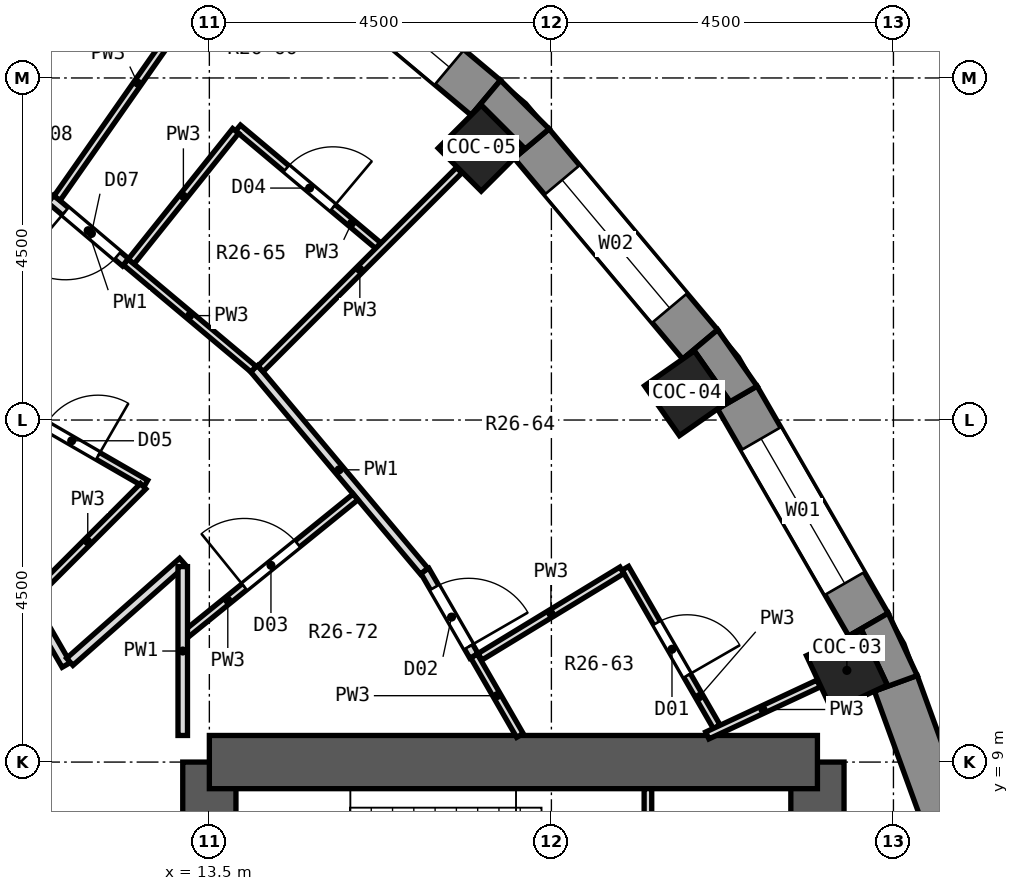
"""IFC4 building model, lengths in metres.
Left out: names, types, materials, properties, quantities, classifications, styles, units other than length and angle.
Written with IfcOpenShell. Run it as: python <this file> out.ifc"""

import sys

from ifc_helpers import new_model, si_unit, direction, frame, frame_2d, origin, origin_2d, place, context, subcontext, project, spatial, polyline, rectangle, outline, extrude, element, fill, save


model = new_model("IFC4")
c1 = context("Model", 3, precision=1e-05, world=origin(), true_north=direction((0.0, 1.0)))
c2 = subcontext(c1, "Body", "Model", "MODEL_VIEW")
j1 = project(units=[si_unit("LENGTHUNIT", "METRE"), si_unit("PLANEANGLEUNIT", "RADIAN")], contexts=[c1])
p1 = place(None, origin())
s1 = spatial("IfcSite", under=j1, at=p1, CompositionType="ELEMENT")
p2 = place(p1, origin())
s2 = spatial("IfcBuilding", under=s1, at=p2, CompositionType="ELEMENT")
p3 = place(p2, frame((0.0, 0.0, 170.7)))
s3 = spatial("IfcBuildingStorey", under=s2, at=p3, CompositionType="ELEMENT", Elevation=170.7)
for number, where, z_axis, x_axis in (
    (1, (21.887, 10.206, 0.0), (0.0, 0.0, 1.0), (0.906, 0.423, 0.0)),
    (2, (19.782, 13.852, 0.0), (0.0, 0.0, 1.0), (0.819, 0.574, 0.0)),
    (3, (17.077, 17.077, 0.0), (0.0, 0.0, 1.0), (0.707, 0.707, 0.0)),
):
    element("IfcColumn", number, at=place(p3, frame(where, z_axis=z_axis, x_axis=x_axis)), inside=s3, PredefinedType="COLUMN", context=c2, shape_type="SweptSolid", body=[
        extrude(rectangle(XDim=0.8, YDim=0.8, at=origin_2d()), origin(), (0.0, 0.0, 1.0), 3.3),
    ])
p4 = place(p3, frame((13.5, -9.0, 0.0), z_axis=(0.0, 0.0, 1.0), x_axis=(0.0, 1.0, 0.0)))
e4 = element("IfcWall", 4, at=p4, inside=s3, PredefinedType="SHEAR", context=c2, shape_type="SweptSolid", body=[
    extrude(rectangle(XDim=18.0, YDim=0.7, at=frame_2d((9.0, 0.0))), origin(), (0.0, 0.0, 1.0), 3.3),
])
p5 = place(p4, frame((15.4, 0.0, 0.0)))
e5 = element("IfcOpeningElement", 5, at=p5, cuts=e4, PredefinedType="OPENING", context=c2, shape_type="SweptSolid", body=[
    extrude(rectangle(XDim=1.2, YDim=2.1, at=frame_2d((0.6, 1.05))), frame((0.0, 0.362, 0.0), z_axis=(0.0, -1.0, 0.0), x_axis=(1.0, 0.0, 0.0)), (0.0, 0.0, 1.0), 0.724),
])
p6 = place(p4, frame((1.4, 0.0, 0.0)))
e6 = element("IfcOpeningElement", 6, at=p6, cuts=e4, PredefinedType="OPENING", context=c2, shape_type="SweptSolid", body=[
    extrude(rectangle(XDim=1.2, YDim=2.1, at=frame_2d((0.6, 1.05))), frame((0.0, 0.362, 0.0), z_axis=(0.0, -1.0, 0.0), x_axis=(1.0, 0.0, 0.0)), (0.0, 0.0, 1.0), 0.724),
])
p7 = place(p4, frame((7.5, 0.0, 0.0)))
e7 = element("IfcOpeningElement", 7, at=p7, cuts=e4, PredefinedType="OPENING", context=c2, shape_type="SweptSolid", body=[
    extrude(rectangle(XDim=3.0, YDim=2.4, at=frame_2d((1.5, 1.2))), frame((0.0, 0.362, 0.0), z_axis=(0.0, -1.0, 0.0), x_axis=(1.0, 0.0, 0.0)), (0.0, 0.0, 1.0), 0.724),
])
p8 = place(p3, frame((21.5, -9.0, 0.0), z_axis=(0.0, 0.0, 1.0), x_axis=(0.0, 1.0, 0.0)))
e8 = element("IfcWall", 8, at=p8, inside=s3, PredefinedType="SHEAR", context=c2, shape_type="SweptSolid", body=[
    extrude(rectangle(XDim=18.0, YDim=0.7, at=frame_2d((9.0, 0.0))), origin(), (0.0, 0.0, 1.0), 3.3),
])
p9 = place(p8, frame((9.45, 0.0, 0.0)))
e9 = element("IfcOpeningElement", 9, at=p9, cuts=e8, PredefinedType="OPENING", context=c2, shape_type="SweptSolid", body=[
    extrude(rectangle(XDim=0.9, YDim=2.1, at=frame_2d((0.45, 1.05))), frame((0.0, 0.362, 0.0), z_axis=(0.0, -1.0, 0.0), x_axis=(1.0, 0.0, 0.0)), (0.0, 0.0, 1.0), 0.724),
])
p10 = place(p8, frame((7.65, 0.0, 0.0)))
e10 = element("IfcOpeningElement", 10, at=p10, cuts=e8, PredefinedType="OPENING", context=c2, shape_type="SweptSolid", body=[
    extrude(rectangle(XDim=0.9, YDim=2.1, at=frame_2d((0.45, 1.05))), frame((0.0, 0.362, 0.0), z_axis=(0.0, -1.0, 0.0), x_axis=(1.0, 0.0, 0.0)), (0.0, 0.0, 1.0), 0.724),
])
p11 = place(p3, frame((13.5, 9.0, 0.0), z_axis=(0.0, 0.0, 1.0), x_axis=(1.0, 0.0, 0.0)))
e11 = element("IfcWall", 11, at=p11, inside=s3, PredefinedType="SHEAR", context=c2, shape_type="SweptSolid", body=[
    extrude(rectangle(XDim=8.0, YDim=0.7, at=frame_2d((4.0, 0.0))), origin(), (0.0, 0.0, 1.0), 3.3),
])
p12 = place(p3, frame((23.711, 6.794, 0.0), z_axis=(0.0, 0.0, 1.0), x_axis=(-0.342032843455, 0.93968799822, 0.0)))
e12 = element("IfcWall", 12, at=p12, inside=s3, PredefinedType="SOLIDWALL", context=c2, shape_type="SweptSolid", body=[
    extrude(rectangle(XDim=3.45, YDim=0.6, at=frame_2d((1.725, 0.0))), origin(), (0.0, 0.0, 1.0), 2.85),
])
p13 = place(p3, frame((22.171, 10.809, 0.0), z_axis=(0.0, 0.0, 1.0), x_axis=(-0.499998129301, 0.86602648383, 0.0)))
e13 = element("IfcWall", 13, at=p13, inside=s3, PredefinedType="SOLIDWALL", context=c2, shape_type="SweptSolid", body=[
    extrude(rectangle(XDim=3.45, YDim=0.6, at=frame_2d((1.725, 0.0))), origin(), (0.0, 0.0, 1.0), 2.85),
])
p14 = place(p13, frame((0.625, 0.0, 0.9)))
e14 = element("IfcOpeningElement", 14, at=p14, cuts=e13, PredefinedType="OPENING", context=c2, shape_type="SweptSolid", body=[
    extrude(rectangle(XDim=2.2, YDim=1.8, at=frame_2d((1.1, 0.9))), frame((0.0, 0.312, 0.0), z_axis=(0.0, -1.0, 0.0), x_axis=(1.0, 0.0, 0.0)), (0.0, 0.0, 1.0), 0.624),
])
p15 = place(p3, frame((19.957, 14.494, 0.0), z_axis=(0.0, 0.0, 1.0), x_axis=(-0.642770398358, 0.766058884809, 0.0)))
e15 = element("IfcWall", 15, at=p15, inside=s3, PredefinedType="SOLIDWALL", context=c2, shape_type="SweptSolid", body=[
    extrude(rectangle(XDim=3.449, YDim=0.6, at=frame_2d((1.725, 0.0))), origin(), (0.0, 0.0, 1.0), 2.85),
])
p16 = place(p15, frame((0.625, 0.0, 0.9)))
e16 = element("IfcOpeningElement", 16, at=p16, cuts=e15, PredefinedType="OPENING", context=c2, shape_type="SweptSolid", body=[
    extrude(rectangle(XDim=2.2, YDim=1.8, at=frame_2d((1.1, 0.9))), frame((0.0, 0.312, 0.0), z_axis=(0.0, -1.0, 0.0), x_axis=(1.0, 0.0, 0.0)), (0.0, 0.0, 1.0), 0.624),
])
p17 = place(p3, frame((17.137, 17.74, 0.0), z_axis=(0.0, 0.0, 1.0), x_axis=(-0.766058884809, 0.642770398358, 0.0)))
e17 = element("IfcWall", 17, at=p17, inside=s3, PredefinedType="SOLIDWALL", context=c2, shape_type="SweptSolid", body=[
    extrude(rectangle(XDim=3.449, YDim=0.6, at=frame_2d((1.725, 0.0))), origin(), (0.0, 0.0, 1.0), 2.85),
])
p18 = place(p17, frame((0.625, 0.0, 0.9)))
e18 = element("IfcOpeningElement", 18, at=p18, cuts=e17, PredefinedType="OPENING", context=c2, shape_type="SweptSolid", body=[
    extrude(rectangle(XDim=2.2, YDim=1.8, at=frame_2d((1.1, 0.9))), frame((0.0, 0.312, 0.0), z_axis=(0.0, -1.0, 0.0), x_axis=(1.0, 0.0, 0.0)), (0.0, 0.0, 1.0), 0.624),
])
p19 = place(p3, origin())
e19 = element("IfcWall", 19, at=p19, inside=s3, PredefinedType="SOLIDWALL", context=c2, shape_type="SweptSolid", body=[
    extrude(outline(polyline([(22.431, 10.959), (21.911, 10.659), (22.081, 10.738), (22.419, 10.013), (22.249, 9.934), (22.813, 10.139), (22.431, 10.959)])), origin(), (0.0, 0.0, 1.0), 2.85),
])
p20 = place(p3, origin())
e20 = element("IfcWall", 20, at=p20, inside=s3, PredefinedType="SOLIDWALL", context=c2, shape_type="SweptSolid", body=[
    extrude(outline(polyline([(20.706, 13.946), (20.187, 14.687), (19.727, 14.302), (19.881, 14.409), (20.34, 13.754), (20.186, 13.646), (20.706, 13.946)])), origin(), (0.0, 0.0, 1.0), 2.85),
])
p21 = place(p3, origin())
e21 = element("IfcWall", 21, at=p21, inside=s3, PredefinedType="SOLIDWALL", context=c2, shape_type="SweptSolid", body=[
    extrude(outline(polyline([(17.33, 17.969), (16.944, 17.51), (17.077, 17.642), (17.642, 17.077), (17.51, 16.944), (17.969, 17.33), (17.33, 17.969)])), origin(), (0.0, 0.0, 1.0), 2.85),
])
p22 = place(p3, frame((11.091, 11.189, 0.0), z_axis=(0.0, 0.0, 1.0), x_axis=(0.499956751108, -0.866050372104, 0.0)))
e22 = element("IfcWall", 22, at=p22, inside=s3, PredefinedType="PARTITIONING", context=c2, shape_type="SweptSolid", body=[
    extrude(rectangle(XDim=1.052, YDim=0.125, at=frame_2d((0.526, 0.0))), origin(), (0.0, 0.0, 1.0), 2.85),
])
p23 = place(p3, frame((16.981, 10.397, 0.0), z_axis=(0.0, 0.0, 1.0), x_axis=(0.499961335607, -0.866047725532, 0.0)))
e23 = element("IfcWall", 23, at=p23, inside=s3, PredefinedType="PARTITIONING", context=c2, shape_type="SweptSolid", body=[
    extrude(rectangle(XDim=1.209, YDim=0.1, at=frame_2d((0.604, 0.0))), origin(), (0.0, 0.0, 1.0), 2.85),
])
p24 = place(p3, frame((16.334, 11.518, 0.0), z_axis=(0.0, 0.0, 1.0), x_axis=(0.499972779981, -0.866041118699, 0.0)))
e24 = element("IfcWall", 24, at=p24, inside=s3, PredefinedType="PARTITIONING", context=c2, shape_type="SweptSolid", body=[
    extrude(rectangle(XDim=1.294, YDim=0.125, at=frame_2d((0.647, 0.0))), origin(), (0.0, 0.0, 1.0), 2.85),
])
p25 = place(p24, frame((0.255, 0.0, 0.0)))
e25 = element("IfcOpeningElement", 25, at=p25, cuts=e24, PredefinedType="OPENING", context=c2, shape_type="SweptSolid", body=[
    extrude(rectangle(XDim=0.9, YDim=2.1, at=frame_2d((0.45, 1.05))), frame((0.0, 0.074, 0.0), z_axis=(0.0, -1.0, 0.0), x_axis=(1.0, 0.0, 0.0)), (0.0, 0.0, 1.0), 0.149),
])
p26 = place(p3, frame((18.972, 11.55, 0.0), z_axis=(0.0, 0.0, 1.0), x_axis=(0.499628829129, -0.866239593359, 0.0)))
e26 = element("IfcWall", 26, at=p26, inside=s3, PredefinedType="PARTITIONING", context=c2, shape_type="SweptSolid", body=[
    extrude(rectangle(XDim=2.408, YDim=0.1, at=frame_2d((1.204, 0.0))), origin(), (0.0, 0.0, 1.0), 2.85),
])
p27 = place(p26, frame((0.83, 0.0, 0.0)))
e27 = element("IfcOpeningElement", 27, at=p27, cuts=e26, PredefinedType="OPENING", context=c2, shape_type="SweptSolid", body=[
    extrude(rectangle(XDim=0.8, YDim=2.1, at=frame_2d((0.4, 1.05))), frame((0.0, 0.062, 0.0), z_axis=(0.0, -1.0, 0.0), x_axis=(1.0, 0.0, 0.0)), (0.0, 0.0, 1.0), 0.124),
])
p28 = place(p3, frame((14.088, 14.178, 0.0), z_axis=(0.0, 0.0, 1.0), x_axis=(0.642836709366, -0.766003240915, 0.0)))
e28 = element("IfcWall", 28, at=p28, inside=s3, PredefinedType="PARTITIONING", context=c2, shape_type="SweptSolid", body=[
    extrude(rectangle(XDim=3.481, YDim=0.125, at=frame_2d((1.74, 0.0))), origin(), (0.0, 0.0, 1.0), 2.85),
])
p29 = place(p3, frame((11.413, 16.408, 0.0), z_axis=(0.0, 0.0, 1.0), x_axis=(0.763379112729, -0.645950718128, 0.0)))
e29 = element("IfcWall", 29, at=p29, inside=s3, PredefinedType="PARTITIONING", context=c2, shape_type="SweptSolid", body=[
    extrude(rectangle(XDim=1.291, YDim=0.125, at=frame_2d((0.646, 0.0))), origin(), (0.0, 0.0, 1.0), 2.85),
])
p30 = place(p29, frame((0.252, 0.0, 0.0)))
e30 = element("IfcOpeningElement", 30, at=p30, cuts=e29, PredefinedType="OPENING", context=c2, shape_type="SweptSolid", body=[
    extrude(rectangle(XDim=0.9, YDim=2.1, at=frame_2d((0.45, 1.05))), frame((0.0, 0.074, 0.0), z_axis=(0.0, -1.0, 0.0), x_axis=(1.0, 0.0, 0.0)), (0.0, 0.0, 1.0), 0.149),
])
p31 = place(p3, frame((12.401, 15.578, 0.0), z_axis=(0.0, 0.0, 1.0), x_axis=(0.766209231034, -0.642591171958, 0.0)))
e31 = element("IfcWall", 31, at=p31, inside=s3, PredefinedType="PARTITIONING", context=c2, shape_type="SweptSolid", body=[
    extrude(rectangle(XDim=2.192, YDim=0.1, at=frame_2d((1.096, 0.0))), origin(), (0.0, 0.0, 1.0), 2.85),
])
p32 = place(p3, frame((13.877, 17.342, 0.0), z_axis=(0.0, 0.0, 1.0), x_axis=(0.766024146731, -0.642811797204, 0.0)))
e32 = element("IfcWall", 32, at=p32, inside=s3, PredefinedType="PARTITIONING", context=c2, shape_type="SweptSolid", body=[
    extrude(rectangle(XDim=2.409, YDim=0.1, at=frame_2d((1.205, 0.0))), origin(), (0.0, 0.0, 1.0), 2.85),
])
p33 = place(p32, frame((0.83, 0.0, 0.0)))
e33 = element("IfcOpeningElement", 33, at=p33, cuts=e32, PredefinedType="OPENING", context=c2, shape_type="SweptSolid", body=[
    extrude(rectangle(XDim=0.8, YDim=2.1, at=frame_2d((0.4, 1.05))), frame((0.0, 0.062, 0.0), z_axis=(0.0, -1.0, 0.0), x_axis=(1.0, 0.0, 0.0)), (0.0, 0.0, 1.0), 0.124),
])
p34 = place(p3, frame((10.714, 13.79, 0.0), z_axis=(0.0, 0.0, 1.0), x_axis=(0.865992377614, -0.500057198642, 0.0)))
e34 = element("IfcWall", 34, at=p34, inside=s3, PredefinedType="PARTITIONING", context=c2, shape_type="SweptSolid", body=[
    extrude(rectangle(XDim=2.252, YDim=0.1, at=frame_2d((1.126, 0.0))), origin(), (0.0, 0.0, 1.0), 2.85),
])
p35 = place(p34, frame((0.726, 0.0, 0.0)))
e35 = element("IfcOpeningElement", 35, at=p35, cuts=e34, PredefinedType="OPENING", context=c2, shape_type="SweptSolid", body=[
    extrude(rectangle(XDim=0.8, YDim=2.1, at=frame_2d((0.4, 1.05))), frame((0.0, 0.062, 0.0), z_axis=(0.0, -1.0, 0.0), x_axis=(1.0, 0.0, 0.0)), (0.0, 0.0, 1.0), 0.124),
])
p36 = place(p3, frame((20.051, 9.35, 0.0), z_axis=(0.0, 0.0, 1.0), x_axis=(0.90621401133, 0.42281930617, 0.0)))
e36 = element("IfcWall", 36, at=p36, inside=s3, PredefinedType="PARTITIONING", context=c2, shape_type="SweptSolid", body=[
    extrude(rectangle(XDim=1.616, YDim=0.1, at=frame_2d((0.808, 0.0))), origin(), (0.0, 0.0, 1.0), 2.85),
])
p37 = place(p3, frame((17.06, 10.385, 0.0), z_axis=(0.0, 0.0, 1.0), x_axis=(0.854045436393, 0.520198416545, 0.0)))
e37 = element("IfcWall", 37, at=p37, inside=s3, PredefinedType="PARTITIONING", context=c2, shape_type="SweptSolid", body=[
    extrude(rectangle(XDim=2.187, YDim=0.1, at=frame_2d((1.093, 0.0))), origin(), (0.0, 0.0, 1.0), 2.85),
])
p38 = place(p3, frame((13.198, 10.688, 0.0), z_axis=(0.0, 0.0, 1.0), x_axis=(0.777201155745, 0.629252225669, 0.0)))
e38 = element("IfcWall", 38, at=p38, inside=s3, PredefinedType="PARTITIONING", context=c2, shape_type="SweptSolid", body=[
    extrude(rectangle(XDim=2.861, YDim=0.1, at=frame_2d((1.431, 0.0))), origin(), (0.0, 0.0, 1.0), 2.85),
])
p39 = place(p38, frame((0.981, 0.0, 0.0)))
e39 = element("IfcOpeningElement", 39, at=p39, cuts=e38, PredefinedType="OPENING", context=c2, shape_type="SweptSolid", body=[
    extrude(rectangle(XDim=0.9, YDim=2.1, at=frame_2d((0.45, 1.05))), frame((0.0, 0.062, 0.0), z_axis=(0.0, -1.0, 0.0), x_axis=(1.0, 0.0, 0.0)), (0.0, 0.0, 1.0), 0.124),
])
p40 = place(p3, frame((11.664, 10.319, 0.0), z_axis=(0.0, 0.0, 1.0), x_axis=(0.748975424904, 0.662597776098, 0.0)))
e40 = element("IfcWall", 40, at=p40, inside=s3, PredefinedType="PARTITIONING", context=c2, shape_type="SweptSolid", body=[
    extrude(rectangle(XDim=1.984, YDim=0.125, at=frame_2d((0.992, 0.0))), origin(), (0.0, 0.0, 1.0), 2.85),
])
p41 = place(p3, frame((11.171, 11.171, 0.0), z_axis=(0.0, 0.0, 1.0), x_axis=(0.707106781187, 0.707106781187, 0.0)))
e41 = element("IfcWall", 41, at=p41, inside=s3, PredefinedType="PARTITIONING", context=c2, shape_type="SweptSolid", body=[
    extrude(rectangle(XDim=2.061, YDim=0.1, at=frame_2d((1.031, 0.0))), origin(), (0.0, 0.0, 1.0), 2.85),
])
p42 = place(p3, frame((14.173, 14.173, 0.0), z_axis=(0.0, 0.0, 1.0), x_axis=(0.707106781187, 0.707106781187, 0.0)))
e42 = element("IfcWall", 42, at=p42, inside=s3, PredefinedType="PARTITIONING", context=c2, shape_type="SweptSolid", body=[
    extrude(rectangle(XDim=3.696, YDim=0.1, at=frame_2d((1.848, 0.0))), origin(), (0.0, 0.0, 1.0), 2.85),
])
p43 = place(p3, frame((12.471, 15.585, 0.0), z_axis=(0.0, 0.0, 1.0), x_axis=(0.624722111344, 0.780847157642, 0.0)))
e43 = element("IfcWall", 43, at=p43, inside=s3, PredefinedType="PARTITIONING", context=c2, shape_type="SweptSolid", body=[
    extrude(rectangle(XDim=2.2, YDim=0.1, at=frame_2d((1.1, 0.0))), origin(), (0.0, 0.0, 1.0), 2.85),
])
p44 = place(p3, frame((11.497, 16.418, 0.0), z_axis=(0.0, 0.0, 1.0), x_axis=(0.573515531974, 0.819194686619, 0.0)))
e44 = element("IfcWall", 44, at=p44, inside=s3, PredefinedType="PARTITIONING", context=c2, shape_type="SweptSolid", body=[
    extrude(rectangle(XDim=3.697, YDim=0.1, at=frame_2d((1.848, 0.0))), origin(), (0.0, 0.0, 1.0), 2.85),
])
p45 = place(p3, frame((10.379, 17.05, 0.0), z_axis=(0.0, 0.0, 1.0), x_axis=(0.520291802012, 0.853988548377, 0.0)))
e45 = element("IfcWall", 45, at=p45, inside=s3, PredefinedType="PARTITIONING", context=c2, shape_type="SweptSolid", body=[
    extrude(rectangle(XDim=2.201, YDim=0.1, at=frame_2d((1.1, 0.0))), origin(), (0.0, 0.0, 1.0), 2.85),
])
p46 = place(p3, frame((13.15, 9.35, 0.0), z_axis=(0.0, 0.0, 1.0), x_axis=(0.0, 1.0, 0.0)))
e46 = element("IfcWall", 46, at=p46, inside=s3, PredefinedType="PARTITIONING", context=c2, shape_type="SweptSolid", body=[
    extrude(rectangle(XDim=2.221, YDim=0.125, at=frame_2d((1.111, 0.0))), origin(), (0.0, 0.0, 1.0), 2.85),
])
p47 = place(p3, frame((19.27, 5.2, 0.0), z_axis=(0.0, 0.0, 1.0), x_axis=(0.0, 1.0, 0.0)))
e47 = element("IfcWall", 47, at=p47, inside=s3, PredefinedType="PARTITIONING", context=c2, shape_type="SweptSolid", body=[
    extrude(rectangle(XDim=3.45, YDim=0.1, at=frame_2d((1.725, 0.0))), origin(), (0.0, 0.0, 1.0), 2.85),
])
p48 = place(p14, origin())
e48 = element("IfcWindow", 48, at=p48, inside=s3, PartitioningType="SINGLE_PANEL", PredefinedType="WINDOW", context=c2, shape_type="SweptSolid", body=[
    extrude(rectangle(XDim=2.2, YDim=1.8, at=frame_2d((1.1, 0.9))), frame((0.0, 0.18, 0.0), z_axis=(0.0, -1.0, 0.0), x_axis=(1.0, 0.0, 0.0)), (0.0, 0.0, 1.0), 0.06),
])
fill(e14, e48)
p49 = place(p16, origin())
e49 = element("IfcWindow", 49, at=p49, inside=s3, PartitioningType="SINGLE_PANEL", PredefinedType="WINDOW", context=c2, shape_type="SweptSolid", body=[
    extrude(rectangle(XDim=2.2, YDim=1.8, at=frame_2d((1.1, 0.9))), frame((0.0, 0.18, 0.0), z_axis=(0.0, -1.0, 0.0), x_axis=(1.0, 0.0, 0.0)), (0.0, 0.0, 1.0), 0.06),
])
fill(e16, e49)
p50 = place(p18, origin())
e50 = element("IfcWindow", 50, at=p50, inside=s3, PartitioningType="SINGLE_PANEL", PredefinedType="WINDOW", context=c2, shape_type="SweptSolid", body=[
    extrude(rectangle(XDim=2.2, YDim=1.8, at=frame_2d((1.1, 0.9))), frame((0.0, 0.18, 0.0), z_axis=(0.0, -1.0, 0.0), x_axis=(1.0, 0.0, 0.0)), (0.0, 0.0, 1.0), 0.06),
])
fill(e18, e50)
p51 = place(p27, origin())
e51 = element("IfcDoor", 51, at=p51, inside=s3, OperationType="SINGLE_SWING_RIGHT", PredefinedType="DOOR", context=c2, shape_type="SweptSolid", body=[
    extrude(rectangle(XDim=0.8, YDim=2.1, at=frame_2d((0.4, 1.05))), frame((0.0, 0.025, 0.0), z_axis=(0.0, -1.0, 0.0), x_axis=(1.0, 0.0, 0.0)), (0.0, 0.0, 1.0), 0.05),
])
fill(e27, e51)
p52 = place(p25, origin())
e52 = element("IfcDoor", 52, at=p52, inside=s3, OperationType="SINGLE_SWING_RIGHT", PredefinedType="DOOR", context=c2, shape_type="SweptSolid", body=[
    extrude(rectangle(XDim=0.9, YDim=2.1, at=frame_2d((0.45, 1.05))), frame((0.0, 0.025, 0.0), z_axis=(0.0, -1.0, 0.0), x_axis=(1.0, 0.0, 0.0)), (0.0, 0.0, 1.0), 0.05),
])
fill(e25, e52)
p53 = place(p39, origin())
e53 = element("IfcDoor", 53, at=p53, inside=s3, OperationType="SINGLE_SWING_LEFT", PredefinedType="DOOR", context=c2, shape_type="SweptSolid", body=[
    extrude(rectangle(XDim=0.9, YDim=2.1, at=frame_2d((0.45, 1.05))), frame((0.0, 0.025, 0.0), z_axis=(0.0, -1.0, 0.0), x_axis=(1.0, 0.0, 0.0)), (0.0, 0.0, 1.0), 0.05),
])
fill(e39, e53)
p54 = place(p33, origin())
e54 = element("IfcDoor", 54, at=p54, inside=s3, OperationType="SINGLE_SWING_RIGHT", PredefinedType="DOOR", context=c2, shape_type="SweptSolid", body=[
    extrude(rectangle(XDim=0.8, YDim=2.1, at=frame_2d((0.4, 1.05))), frame((0.0, 0.025, 0.0), z_axis=(0.0, -1.0, 0.0), x_axis=(1.0, 0.0, 0.0)), (0.0, 0.0, 1.0), 0.05),
])
fill(e33, e54)
p55 = place(p35, origin())
e55 = element("IfcDoor", 55, at=p55, inside=s3, OperationType="SINGLE_SWING_RIGHT", PredefinedType="DOOR", context=c2, shape_type="SweptSolid", body=[
    extrude(rectangle(XDim=0.8, YDim=2.1, at=frame_2d((0.4, 1.05))), frame((0.0, 0.025, 0.0), z_axis=(0.0, -1.0, 0.0), x_axis=(1.0, 0.0, 0.0)), (0.0, 0.0, 1.0), 0.05),
])
fill(e35, e55)
p56 = place(p30, frame((0.9, 0.0, 0.0), z_axis=(0.0, 0.0, 1.0), x_axis=(-1.0, 0.0, 0.0)))
e56 = element("IfcDoor", 56, at=p56, inside=s3, OperationType="SINGLE_SWING_RIGHT", PredefinedType="DOOR", context=c2, shape_type="SweptSolid", body=[
    extrude(rectangle(XDim=0.9, YDim=2.1, at=frame_2d((0.45, 1.05))), frame((0.0, 0.025, 0.0), z_axis=(0.0, -1.0, 0.0), x_axis=(1.0, 0.0, 0.0)), (0.0, 0.0, 1.0), 0.05),
])
fill(e30, e56)
save(model, sys.argv[1])
